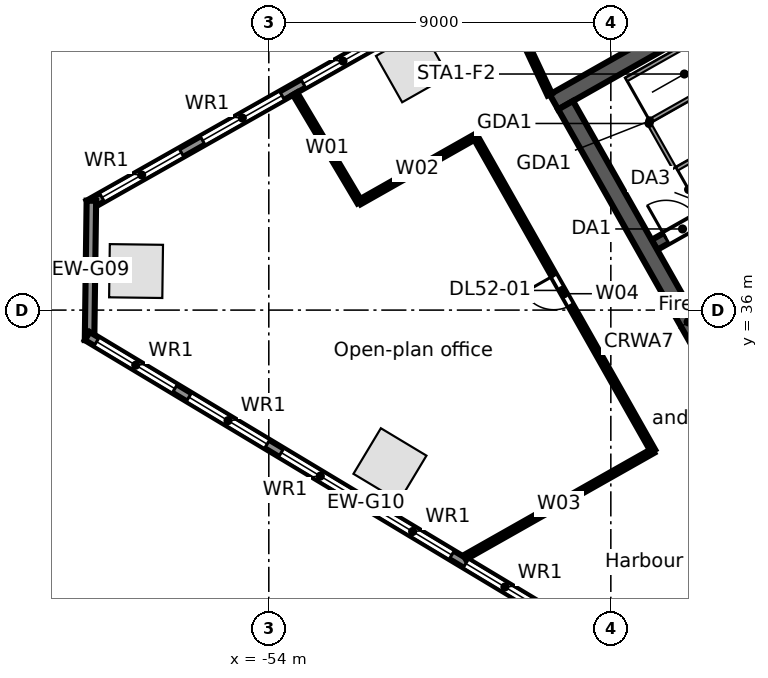
"""IFC4 building model, lengths in metres.
Left out: names, types, materials, properties, quantities, classifications, styles, units other than length and angle.
Written with IfcOpenShell. Run it as: python <this file> out.ifc"""

import sys

from ifc_helpers import new_model, si_unit, direction, frame, frame_2d, origin, origin_2d, place, context, subcontext, project, spatial, rectangle, extrude, element, fill, save


model = new_model("IFC4")
c1 = context("Model", 3, precision=1e-05, world=origin(), true_north=direction((0.0, 1.0)))
c2 = subcontext(c1, "Body", "Model", "MODEL_VIEW")
j1 = project(units=[si_unit("LENGTHUNIT", "METRE"), si_unit("PLANEANGLEUNIT", "RADIAN")], contexts=[c1])
p1 = place(None, origin())
s1 = spatial("IfcSite", under=j1, at=p1, CompositionType="ELEMENT")
p2 = place(p1, origin())
s2 = spatial("IfcBuilding", under=s1, at=p2, CompositionType="ELEMENT")
p3 = place(p2, frame((0.0, 0.0, 238.7)))
s3 = spatial("IfcBuildingStorey", under=s2, at=p3, CompositionType="ELEMENT", Elevation=238.7)
for number, where, z_axis, x_axis in (
    (1, (-50.226, 42.423, 0.0), (0.0, 0.0, 1.0), (-0.87, -0.492, 0.0)),
    (2, (-57.493, 37.027, 0.0), (0.0, 0.0, 1.0), (-0.013, -1.0, 0.0)),
    (3, (-50.812, 31.931, 0.0), (0.0, 0.0, 1.0), (0.857, -0.515, 0.0)),
):
    element("IfcColumn", number, at=place(p3, frame(where, z_axis=z_axis, x_axis=x_axis)), inside=s3, PredefinedType="COLUMN", context=c2, shape_type="SweptSolid", body=[
        extrude(rectangle(XDim=1.4, YDim=1.4, at=origin_2d()), origin(), (0.0, 0.0, 1.0), 3.9),
    ])
p4 = place(p3, frame((-58.732, 38.771, 0.0), z_axis=(0.0, 0.0, 1.0), x_axis=(0.870354824205, 0.492425100887, 0.0)))
e4 = element("IfcWall", 4, at=p4, inside=s3, PredefinedType="STANDARD", context=c2, shape_type="SweptSolid", body=[
    extrude(rectangle(XDim=64.006, YDim=0.25, at=frame_2d((32.003, 0.0))), origin(), (0.0, 0.0, 1.0), 3.62),
])
p5 = place(p4, frame((61.259, 0.0, 0.8)))
e5 = element("IfcOpeningElement", 5, at=p5, cuts=e4, PredefinedType="OPENING", context=c2, shape_type="SweptSolid", body=[
    extrude(rectangle(XDim=2.4, YDim=2.2, at=frame_2d((1.2, 1.1))), frame((0.0, 0.135, 0.0), z_axis=(0.0, -1.0, 0.0), x_axis=(1.0, 0.0, 0.0)), (0.0, 0.0, 1.0), 0.27),
])
p6 = place(p4, frame((58.216, 0.0, 0.8)))
e6 = element("IfcOpeningElement", 6, at=p6, cuts=e4, PredefinedType="OPENING", context=c2, shape_type="SweptSolid", body=[
    extrude(rectangle(XDim=2.4, YDim=2.2, at=frame_2d((1.2, 1.1))), frame((0.0, 0.135, 0.0), z_axis=(0.0, -1.0, 0.0), x_axis=(1.0, 0.0, 0.0)), (0.0, 0.0, 1.0), 0.27),
])
p7 = place(p4, frame((55.173, 0.0, 0.8)))
e7 = element("IfcOpeningElement", 7, at=p7, cuts=e4, PredefinedType="OPENING", context=c2, shape_type="SweptSolid", body=[
    extrude(rectangle(XDim=2.4, YDim=2.2, at=frame_2d((1.2, 1.1))), frame((0.0, 0.135, 0.0), z_axis=(0.0, -1.0, 0.0), x_axis=(1.0, 0.0, 0.0)), (0.0, 0.0, 1.0), 0.27),
])
p8 = place(p4, frame((52.129, 0.0, 0.8)))
e8 = element("IfcOpeningElement", 8, at=p8, cuts=e4, PredefinedType="OPENING", context=c2, shape_type="SweptSolid", body=[
    extrude(rectangle(XDim=2.4, YDim=2.2, at=frame_2d((1.2, 1.1))), frame((0.0, 0.135, 0.0), z_axis=(0.0, -1.0, 0.0), x_axis=(1.0, 0.0, 0.0)), (0.0, 0.0, 1.0), 0.27),
])
p9 = place(p4, frame((49.086, 0.0, 0.8)))
e9 = element("IfcOpeningElement", 9, at=p9, cuts=e4, PredefinedType="OPENING", context=c2, shape_type="SweptSolid", body=[
    extrude(rectangle(XDim=2.4, YDim=2.2, at=frame_2d((1.2, 1.1))), frame((0.0, 0.135, 0.0), z_axis=(0.0, -1.0, 0.0), x_axis=(1.0, 0.0, 0.0)), (0.0, 0.0, 1.0), 0.27),
])
p10 = place(p4, frame((46.043, 0.0, 0.8)))
e10 = element("IfcOpeningElement", 10, at=p10, cuts=e4, PredefinedType="OPENING", context=c2, shape_type="SweptSolid", body=[
    extrude(rectangle(XDim=2.4, YDim=2.2, at=frame_2d((1.2, 1.1))), frame((0.0, 0.135, 0.0), z_axis=(0.0, -1.0, 0.0), x_axis=(1.0, 0.0, 0.0)), (0.0, 0.0, 1.0), 0.27),
])
p11 = place(p4, frame((43.0, 0.0, 0.8)))
e11 = element("IfcOpeningElement", 11, at=p11, cuts=e4, PredefinedType="OPENING", context=c2, shape_type="SweptSolid", body=[
    extrude(rectangle(XDim=2.4, YDim=2.2, at=frame_2d((1.2, 1.1))), frame((0.0, 0.135, 0.0), z_axis=(0.0, -1.0, 0.0), x_axis=(1.0, 0.0, 0.0)), (0.0, 0.0, 1.0), 0.27),
])
p12 = place(p4, frame((39.956, 0.0, 0.8)))
e12 = element("IfcOpeningElement", 12, at=p12, cuts=e4, PredefinedType="OPENING", context=c2, shape_type="SweptSolid", body=[
    extrude(rectangle(XDim=2.4, YDim=2.2, at=frame_2d((1.2, 1.1))), frame((0.0, 0.135, 0.0), z_axis=(0.0, -1.0, 0.0), x_axis=(1.0, 0.0, 0.0)), (0.0, 0.0, 1.0), 0.27),
])
p13 = place(p4, frame((36.913, 0.0, 0.8)))
e13 = element("IfcOpeningElement", 13, at=p13, cuts=e4, PredefinedType="OPENING", context=c2, shape_type="SweptSolid", body=[
    extrude(rectangle(XDim=2.4, YDim=2.2, at=frame_2d((1.2, 1.1))), frame((0.0, 0.135, 0.0), z_axis=(0.0, -1.0, 0.0), x_axis=(1.0, 0.0, 0.0)), (0.0, 0.0, 1.0), 0.27),
])
p14 = place(p4, frame((33.87, 0.0, 0.8)))
e14 = element("IfcOpeningElement", 14, at=p14, cuts=e4, PredefinedType="OPENING", context=c2, shape_type="SweptSolid", body=[
    extrude(rectangle(XDim=2.4, YDim=2.2, at=frame_2d((1.2, 1.1))), frame((0.0, 0.135, 0.0), z_axis=(0.0, -1.0, 0.0), x_axis=(1.0, 0.0, 0.0)), (0.0, 0.0, 1.0), 0.27),
])
p15 = place(p4, frame((30.826, 0.0, 0.8)))
e15 = element("IfcOpeningElement", 15, at=p15, cuts=e4, PredefinedType="OPENING", context=c2, shape_type="SweptSolid", body=[
    extrude(rectangle(XDim=2.4, YDim=2.2, at=frame_2d((1.2, 1.1))), frame((0.0, 0.135, 0.0), z_axis=(0.0, -1.0, 0.0), x_axis=(1.0, 0.0, 0.0)), (0.0, 0.0, 1.0), 0.27),
])
p16 = place(p4, frame((27.783, 0.0, 0.8)))
e16 = element("IfcOpeningElement", 16, at=p16, cuts=e4, PredefinedType="OPENING", context=c2, shape_type="SweptSolid", body=[
    extrude(rectangle(XDim=2.4, YDim=2.2, at=frame_2d((1.2, 1.1))), frame((0.0, 0.135, 0.0), z_axis=(0.0, -1.0, 0.0), x_axis=(1.0, 0.0, 0.0)), (0.0, 0.0, 1.0), 0.27),
])
p17 = place(p4, frame((24.74, 0.0, 0.8)))
e17 = element("IfcOpeningElement", 17, at=p17, cuts=e4, PredefinedType="OPENING", context=c2, shape_type="SweptSolid", body=[
    extrude(rectangle(XDim=2.4, YDim=2.2, at=frame_2d((1.2, 1.1))), frame((0.0, 0.135, 0.0), z_axis=(0.0, -1.0, 0.0), x_axis=(1.0, 0.0, 0.0)), (0.0, 0.0, 1.0), 0.27),
])
p18 = place(p4, frame((21.696, 0.0, 0.8)))
e18 = element("IfcOpeningElement", 18, at=p18, cuts=e4, PredefinedType="OPENING", context=c2, shape_type="SweptSolid", body=[
    extrude(rectangle(XDim=2.4, YDim=2.2, at=frame_2d((1.2, 1.1))), frame((0.0, 0.135, 0.0), z_axis=(0.0, -1.0, 0.0), x_axis=(1.0, 0.0, 0.0)), (0.0, 0.0, 1.0), 0.27),
])
p19 = place(p4, frame((18.653, 0.0, 0.8)))
e19 = element("IfcOpeningElement", 19, at=p19, cuts=e4, PredefinedType="OPENING", context=c2, shape_type="SweptSolid", body=[
    extrude(rectangle(XDim=2.4, YDim=2.2, at=frame_2d((1.2, 1.1))), frame((0.0, 0.135, 0.0), z_axis=(0.0, -1.0, 0.0), x_axis=(1.0, 0.0, 0.0)), (0.0, 0.0, 1.0), 0.27),
])
p20 = place(p4, frame((15.61, 0.0, 0.8)))
e20 = element("IfcOpeningElement", 20, at=p20, cuts=e4, PredefinedType="OPENING", context=c2, shape_type="SweptSolid", body=[
    extrude(rectangle(XDim=2.4, YDim=2.2, at=frame_2d((1.2, 1.1))), frame((0.0, 0.135, 0.0), z_axis=(0.0, -1.0, 0.0), x_axis=(1.0, 0.0, 0.0)), (0.0, 0.0, 1.0), 0.27),
])
p21 = place(p4, frame((12.567, 0.0, 0.8)))
e21 = element("IfcOpeningElement", 21, at=p21, cuts=e4, PredefinedType="OPENING", context=c2, shape_type="SweptSolid", body=[
    extrude(rectangle(XDim=2.4, YDim=2.2, at=frame_2d((1.2, 1.1))), frame((0.0, 0.135, 0.0), z_axis=(0.0, -1.0, 0.0), x_axis=(1.0, 0.0, 0.0)), (0.0, 0.0, 1.0), 0.27),
])
p22 = place(p4, frame((9.523, 0.0, 0.8)))
e22 = element("IfcOpeningElement", 22, at=p22, cuts=e4, PredefinedType="OPENING", context=c2, shape_type="SweptSolid", body=[
    extrude(rectangle(XDim=2.4, YDim=2.2, at=frame_2d((1.2, 1.1))), frame((0.0, 0.135, 0.0), z_axis=(0.0, -1.0, 0.0), x_axis=(1.0, 0.0, 0.0)), (0.0, 0.0, 1.0), 0.27),
])
p23 = place(p4, frame((6.48, 0.0, 0.8)))
e23 = element("IfcOpeningElement", 23, at=p23, cuts=e4, PredefinedType="OPENING", context=c2, shape_type="SweptSolid", body=[
    extrude(rectangle(XDim=2.4, YDim=2.2, at=frame_2d((1.2, 1.1))), frame((0.0, 0.135, 0.0), z_axis=(0.0, -1.0, 0.0), x_axis=(1.0, 0.0, 0.0)), (0.0, 0.0, 1.0), 0.27),
])
p24 = place(p4, frame((3.437, 0.0, 0.8)))
e24 = element("IfcOpeningElement", 24, at=p24, cuts=e4, PredefinedType="OPENING", context=c2, shape_type="SweptSolid", body=[
    extrude(rectangle(XDim=2.4, YDim=2.2, at=frame_2d((1.2, 1.1))), frame((0.0, 0.135, 0.0), z_axis=(0.0, -1.0, 0.0), x_axis=(1.0, 0.0, 0.0)), (0.0, 0.0, 1.0), 0.27),
])
p25 = place(p4, frame((0.393, 0.0, 0.8)))
e25 = element("IfcOpeningElement", 25, at=p25, cuts=e4, PredefinedType="OPENING", context=c2, shape_type="SweptSolid", body=[
    extrude(rectangle(XDim=2.4, YDim=2.2, at=frame_2d((1.2, 1.1))), frame((0.0, 0.135, 0.0), z_axis=(0.0, -1.0, 0.0), x_axis=(1.0, 0.0, 0.0)), (0.0, 0.0, 1.0), 0.27),
])
p26 = place(p3, frame((-58.717, 35.208, 0.0), z_axis=(0.0, 0.0, 1.0), x_axis=(0.01310512158, 0.999914124207, 0.0)))
e26 = element("IfcWall", 26, at=p26, inside=s3, PredefinedType="STANDARD", context=c2, shape_type="SweptSolid", body=[
    extrude(rectangle(XDim=3.67, YDim=0.25, at=frame_2d((1.835, 0.0))), origin(), (0.0, 0.0, 1.0), 3.62),
])
p27 = place(p3, frame((-44.115, 26.507, 0.0), z_axis=(0.0, 0.0, 1.0), x_axis=(-0.857166583633, 0.515039268311, 0.0)))
e27 = element("IfcWall", 27, at=p27, inside=s3, PredefinedType="STANDARD", context=c2, shape_type="SweptSolid", body=[
    extrude(rectangle(XDim=17.106, YDim=0.25, at=frame_2d((8.553, 0.0))), origin(), (0.0, 0.0, 1.0), 3.62),
])
p28 = place(p27, frame((14.417, 0.0, 0.8)))
e28 = element("IfcOpeningElement", 28, at=p28, cuts=e27, PredefinedType="OPENING", context=c2, shape_type="SweptSolid", body=[
    extrude(rectangle(XDim=2.4, YDim=2.2, at=frame_2d((1.2, 1.1))), frame((0.0, 0.135, 0.0), z_axis=(0.0, -1.0, 0.0), x_axis=(1.0, 0.0, 0.0)), (0.0, 0.0, 1.0), 0.27),
])
p29 = place(p27, frame((11.584, 0.0, 0.8)))
e29 = element("IfcOpeningElement", 29, at=p29, cuts=e27, PredefinedType="OPENING", context=c2, shape_type="SweptSolid", body=[
    extrude(rectangle(XDim=2.4, YDim=2.2, at=frame_2d((1.2, 1.1))), frame((0.0, 0.135, 0.0), z_axis=(0.0, -1.0, 0.0), x_axis=(1.0, 0.0, 0.0)), (0.0, 0.0, 1.0), 0.27),
])
p30 = place(p27, frame((8.75, 0.0, 0.8)))
e30 = element("IfcOpeningElement", 30, at=p30, cuts=e27, PredefinedType="OPENING", context=c2, shape_type="SweptSolid", body=[
    extrude(rectangle(XDim=2.4, YDim=2.2, at=frame_2d((1.2, 1.1))), frame((0.0, 0.135, 0.0), z_axis=(0.0, -1.0, 0.0), x_axis=(1.0, 0.0, 0.0)), (0.0, 0.0, 1.0), 0.27),
])
p31 = place(p27, frame((5.917, 0.0, 0.8)))
e31 = element("IfcOpeningElement", 31, at=p31, cuts=e27, PredefinedType="OPENING", context=c2, shape_type="SweptSolid", body=[
    extrude(rectangle(XDim=2.4, YDim=2.2, at=frame_2d((1.2, 1.1))), frame((0.0, 0.135, 0.0), z_axis=(0.0, -1.0, 0.0), x_axis=(1.0, 0.0, 0.0)), (0.0, 0.0, 1.0), 0.27),
])
p32 = place(p27, frame((3.084, 0.0, 0.8)))
e32 = element("IfcOpeningElement", 32, at=p32, cuts=e27, PredefinedType="OPENING", context=c2, shape_type="SweptSolid", body=[
    extrude(rectangle(XDim=2.4, YDim=2.2, at=frame_2d((1.2, 1.1))), frame((0.0, 0.135, 0.0), z_axis=(0.0, -1.0, 0.0), x_axis=(1.0, 0.0, 0.0)), (0.0, 0.0, 1.0), 0.27),
])
p33 = place(p27, frame((0.25, 0.0, 0.8)))
e33 = element("IfcOpeningElement", 33, at=p33, cuts=e27, PredefinedType="OPENING", context=c2, shape_type="SweptSolid", body=[
    extrude(rectangle(XDim=2.4, YDim=2.2, at=frame_2d((1.2, 1.1))), frame((0.0, 0.135, 0.0), z_axis=(0.0, -1.0, 0.0), x_axis=(1.0, 0.0, 0.0)), (0.0, 0.0, 1.0), 0.27),
])
p34 = place(p3, frame((-43.853, 37.717, 0.0), z_axis=(0.0, 0.0, 1.0), x_axis=(0.870360409231, 0.492415229297, 0.0)))
e34 = element("IfcWall", 34, at=p34, inside=s3, PredefinedType="SOLIDWALL", context=c2, shape_type="SweptSolid", body=[
    extrude(rectangle(XDim=7.55, YDim=0.3, at=frame_2d((3.775, 0.0))), origin(), (0.0, 0.0, 1.0), 3.62),
])
p35 = place(p34, frame((0.35, 0.0, 0.0)))
e35 = element("IfcOpeningElement", 35, at=p35, cuts=e34, PredefinedType="OPENING", context=c2, shape_type="SweptSolid", body=[
    extrude(rectangle(XDim=1.0, YDim=2.1, at=frame_2d((0.5, 1.05))), frame((0.0, 0.16, 0.0), z_axis=(0.0, -1.0, 0.0), x_axis=(1.0, 0.0, 0.0)), (0.0, 0.0, 1.0), 0.32),
])
p36 = place(p3, frame((-46.498, 41.477, 0.0), z_axis=(0.0, 0.0, 1.0), x_axis=(0.870359753402, 0.492416388494, 0.0)))
e36 = element("IfcWall", 36, at=p36, inside=s3, PredefinedType="SOLIDWALL", context=c2, shape_type="SweptSolid", body=[
    extrude(rectangle(XDim=17.0, YDim=0.45, at=frame_2d((8.5, 0.0))), origin(), (0.0, 0.0, 1.0), 3.62),
])
p37 = place(p3, frame((-46.191, 41.392, 0.0), z_axis=(0.0, 0.0, 1.0), x_axis=(0.492421378713, -0.870356930107, 0.0)))
e37 = element("IfcWall", 37, at=p37, inside=s3, PredefinedType="SOLIDWALL", context=c2, shape_type="SweptSolid", body=[
    extrude(rectangle(XDim=13.1, YDim=0.45, at=frame_2d((6.55, 0.0))), origin(), (0.0, 0.0, 1.0), 3.62),
])
p38 = place(p3, frame((-53.309, 41.696, 0.0), z_axis=(0.0, 0.0, 1.0), x_axis=(0.510739180143, -0.859735709312, 0.0)))
e38 = element("IfcWall", 38, at=p38, inside=s3, PredefinedType="PARTITIONING", context=c2, shape_type="SweptSolid", body=[
    extrude(rectangle(XDim=3.321, YDim=0.125, at=frame_2d((1.66, 0.0))), origin(), (0.0, 0.0, 1.0), 2.994),
])
p39 = place(p3, frame((-51.613, 38.841, 0.0), z_axis=(0.0, 0.0, 1.0), x_axis=(0.870300294116, 0.492521469645, 0.0)))
e39 = element("IfcWall", 39, at=p39, inside=s3, PredefinedType="PARTITIONING", context=c2, shape_type="SweptSolid", body=[
    extrude(rectangle(XDim=3.5, YDim=0.125, at=frame_2d((1.75, 0.0))), origin(), (0.0, 0.0, 1.0), 2.9),
])
p40 = place(p3, frame((-48.843, 29.494, 0.0), z_axis=(0.0, 0.0, 1.0), x_axis=(0.870331085166, 0.492467056962, 0.0)))
e40 = element("IfcWall", 40, at=p40, inside=s3, PredefinedType="PARTITIONING", context=c2, shape_type="SweptSolid", body=[
    extrude(rectangle(XDim=5.692, YDim=0.125, at=frame_2d((2.846, 0.0))), origin(), (0.0, 0.0, 1.0), 2.9),
])
p41 = place(p3, frame((-48.567, 40.565, 0.0), z_axis=(0.0, 0.0, 1.0), x_axis=(0.492445070084, -0.870343525828, 0.0)))
e41 = element("IfcWall", 41, at=p41, inside=s3, PredefinedType="PARTITIONING", context=c2, shape_type="SweptSolid", body=[
    extrude(rectangle(XDim=9.5, YDim=0.125, at=frame_2d((4.75, 0.0))), origin(), (0.0, 0.0, 1.0), 2.9),
])
p42 = place(p41, frame((4.2, 0.0, 0.0)))
e42 = element("IfcOpeningElement", 42, at=p42, cuts=e41, PredefinedType="OPENING", context=c2, shape_type="SweptSolid", body=[
    extrude(rectangle(XDim=0.9, YDim=2.1, at=frame_2d((0.45, 1.05))), frame((0.0, 0.073, 0.0), z_axis=(0.0, -1.0, 0.0), x_axis=(1.0, 0.0, 0.0)), (0.0, 0.0, 1.0), 0.145),
])
p43 = place(p3, frame((-48.022, 44.687, 0.0), z_axis=(0.0, 0.0, 1.0), x_axis=(0.424510917438, -0.905422818895, 0.0)))
e43 = element("IfcWall", 43, at=p43, inside=s3, PredefinedType="PARTITIONING", context=c2, shape_type="SweptSolid", body=[
    extrude(rectangle(XDim=3.329, YDim=0.125, at=frame_2d((1.665, 0.0))), origin(), (0.0, 0.0, 1.0), 2.988),
])
p44 = place(p23, origin())
e44 = element("IfcWindow", 44, at=p44, inside=s3, PartitioningType="SINGLE_PANEL", PredefinedType="WINDOW", context=c2, shape_type="SweptSolid", body=[
    extrude(rectangle(XDim=2.4, YDim=2.2, at=frame_2d((1.2, 1.1))), frame((0.0, 0.03, 0.0), z_axis=(0.0, -1.0, 0.0), x_axis=(1.0, 0.0, 0.0)), (0.0, 0.0, 1.0), 0.06),
])
fill(e23, e44)
p45 = place(p24, origin())
e45 = element("IfcWindow", 45, at=p45, inside=s3, PartitioningType="SINGLE_PANEL", PredefinedType="WINDOW", context=c2, shape_type="SweptSolid", body=[
    extrude(rectangle(XDim=2.4, YDim=2.2, at=frame_2d((1.2, 1.1))), frame((0.0, 0.03, 0.0), z_axis=(0.0, -1.0, 0.0), x_axis=(1.0, 0.0, 0.0)), (0.0, 0.0, 1.0), 0.06),
])
fill(e24, e45)
p46 = place(p25, origin())
e46 = element("IfcWindow", 46, at=p46, inside=s3, PartitioningType="SINGLE_PANEL", PredefinedType="WINDOW", context=c2, shape_type="SweptSolid", body=[
    extrude(rectangle(XDim=2.4, YDim=2.2, at=frame_2d((1.2, 1.1))), frame((0.0, 0.03, 0.0), z_axis=(0.0, -1.0, 0.0), x_axis=(1.0, 0.0, 0.0)), (0.0, 0.0, 1.0), 0.06),
])
fill(e25, e46)
p47 = place(p28, origin())
e47 = element("IfcWindow", 47, at=p47, inside=s3, PartitioningType="SINGLE_PANEL", PredefinedType="WINDOW", context=c2, shape_type="SweptSolid", body=[
    extrude(rectangle(XDim=2.4, YDim=2.2, at=frame_2d((1.2, 1.1))), frame((0.0, 0.03, 0.0), z_axis=(0.0, -1.0, 0.0), x_axis=(1.0, 0.0, 0.0)), (0.0, 0.0, 1.0), 0.06),
])
fill(e28, e47)
p48 = place(p29, origin())
e48 = element("IfcWindow", 48, at=p48, inside=s3, PartitioningType="SINGLE_PANEL", PredefinedType="WINDOW", context=c2, shape_type="SweptSolid", body=[
    extrude(rectangle(XDim=2.4, YDim=2.2, at=frame_2d((1.2, 1.1))), frame((0.0, 0.03, 0.0), z_axis=(0.0, -1.0, 0.0), x_axis=(1.0, 0.0, 0.0)), (0.0, 0.0, 1.0), 0.06),
])
fill(e29, e48)
p49 = place(p30, origin())
e49 = element("IfcWindow", 49, at=p49, inside=s3, PartitioningType="SINGLE_PANEL", PredefinedType="WINDOW", context=c2, shape_type="SweptSolid", body=[
    extrude(rectangle(XDim=2.4, YDim=2.2, at=frame_2d((1.2, 1.1))), frame((0.0, 0.03, 0.0), z_axis=(0.0, -1.0, 0.0), x_axis=(1.0, 0.0, 0.0)), (0.0, 0.0, 1.0), 0.06),
])
fill(e30, e49)
p50 = place(p31, origin())
e50 = element("IfcWindow", 50, at=p50, inside=s3, PartitioningType="SINGLE_PANEL", PredefinedType="WINDOW", context=c2, shape_type="SweptSolid", body=[
    extrude(rectangle(XDim=2.4, YDim=2.2, at=frame_2d((1.2, 1.1))), frame((0.0, 0.03, 0.0), z_axis=(0.0, -1.0, 0.0), x_axis=(1.0, 0.0, 0.0)), (0.0, 0.0, 1.0), 0.06),
])
fill(e31, e50)
p51 = place(p32, origin())
e51 = element("IfcWindow", 51, at=p51, inside=s3, PartitioningType="SINGLE_PANEL", PredefinedType="WINDOW", context=c2, shape_type="SweptSolid", body=[
    extrude(rectangle(XDim=2.4, YDim=2.2, at=frame_2d((1.2, 1.1))), frame((0.0, 0.03, 0.0), z_axis=(0.0, -1.0, 0.0), x_axis=(1.0, 0.0, 0.0)), (0.0, 0.0, 1.0), 0.06),
])
fill(e32, e51)
p52 = place(p35, origin())
e52 = element("IfcDoor", 52, at=p52, inside=s3, OperationType="SINGLE_SWING_LEFT", PredefinedType="DOOR", context=c2, shape_type="SweptSolid", body=[
    extrude(rectangle(XDim=1.0, YDim=2.1, at=frame_2d((0.5, 1.05))), frame((0.0, 0.025, 0.0), z_axis=(0.0, -1.0, 0.0), x_axis=(1.0, 0.0, 0.0)), (0.0, 0.0, 1.0), 0.05),
])
fill(e35, e52)
p53 = place(p42, frame((0.9, 0.0, 0.0), z_axis=(0.0, 0.0, 1.0), x_axis=(-1.0, 0.0, 0.0)))
e53 = element("IfcDoor", 53, at=p53, inside=s3, OperationType="SINGLE_SWING_RIGHT", PredefinedType="DOOR", context=c2, shape_type="SweptSolid", body=[
    extrude(rectangle(XDim=0.9, YDim=2.1, at=frame_2d((0.45, 1.05))), frame((0.0, 0.025, 0.0), z_axis=(0.0, -1.0, 0.0), x_axis=(1.0, 0.0, 0.0)), (0.0, 0.0, 1.0), 0.05),
])
fill(e42, e53)
save(model, sys.argv[1])
